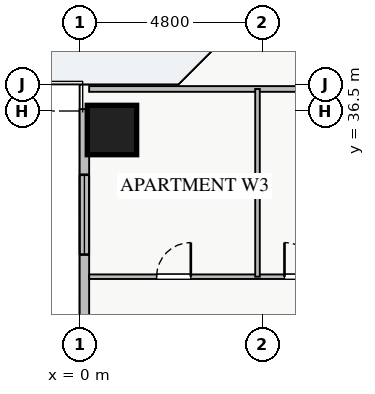
"""IFC4 building model, lengths in metres.
Left out: names, types, materials, properties, quantities, classifications, styles, units other than length and angle.
Written with IfcOpenShell. Run it as: python <this file> out.ifc"""

import sys

from ifc_helpers import new_model, si_unit, direction, frame, frame_2d, origin, origin_2d, place, context, subcontext, project, spatial, rectangle, extrude, source, transform, mapped, element, fill, save


model = new_model("IFC4")
c1 = context("Model", 3, precision=1e-05, world=origin(), true_north=direction((0.0, 1.0)))
c2 = subcontext(c1, "Body", "Model", "MODEL_VIEW")
j1 = project(units=[si_unit("LENGTHUNIT", "METRE"), si_unit("PLANEANGLEUNIT", "RADIAN")], contexts=[c1])
p1 = place(None, origin())
s1 = spatial("IfcSite", under=j1, at=p1, CompositionType="ELEMENT")
p2 = place(p1, origin())
s2 = spatial("IfcBuilding", under=s1, at=p2, CompositionType="ELEMENT")
p3 = place(p2, frame((0.0, 0.0, 42.5)))
s3 = spatial("IfcBuildingStorey", under=s2, at=p3, CompositionType="ELEMENT", Elevation=42.5)
m1 = source(origin(), c2, "Body", "SweptSolid", [
    extrude(rectangle(XDim=1.3, YDim=1.3, at=origin_2d()), origin(), (0.0, 0.0, 1.0), 3.25),
])
p4 = place(p3, frame((0.85, 36.0, 0.0), z_axis=(0.0, 0.0, 1.0), x_axis=(1.0, 0.0, 0.0)))
e1 = element("IfcColumn", 1, at=p4, inside=s3, PredefinedType="COLUMN", context=c2, shape_type="MappedRepresentation", body=[
    mapped(m1, transform((0.0, 0.0, 0.0), x_axis=(1.0, 0.0, 0.0), y_axis=(0.0, 1.0, 0.0), z_axis=(0.0, 0.0, 1.0), scale=1.0)),
])
p5 = place(p3, frame((0.125, 9.45, 0.0), z_axis=(0.0, 0.0, 1.0), x_axis=(0.0, 1.0, 0.0)))
e2 = element("IfcWall", 2, at=p5, inside=s3, PredefinedType="STANDARD", context=c2, shape_type="SweptSolid", body=[
    extrude(rectangle(XDim=27.1, YDim=0.25, at=frame_2d((13.55, 0.0))), origin(), (0.0, 0.0, 1.0), 2.57),
])
p6 = place(p5, frame((14.4, 0.0, 0.0)))
e3 = element("IfcOpeningElement", 3, at=p6, cuts=e2, PredefinedType="OPENING", context=c2, shape_type="SweptSolid", body=[
    extrude(rectangle(XDim=1.2, YDim=2.1, at=frame_2d((0.6, 1.05))), frame((0.0, 0.135, 0.0), z_axis=(0.0, -1.0, 0.0), x_axis=(1.0, 0.0, 0.0)), (0.0, 0.0, 1.0), 0.27),
])
p7 = place(p5, frame((2.188, 0.0, 0.9)))
e4 = element("IfcOpeningElement", 4, at=p7, cuts=e2, PredefinedType="OPENING", context=c2, shape_type="SweptSolid", body=[
    extrude(rectangle(XDim=2.4, YDim=1.48, at=frame_2d((1.2, 0.74))), frame((0.0, 0.135, 0.0), z_axis=(0.0, -1.0, 0.0), x_axis=(1.0, 0.0, 0.0)), (0.0, 0.0, 1.0), 0.27),
])
p8 = place(p5, frame((23.272, 0.0, 0.9)))
e5 = element("IfcOpeningElement", 5, at=p8, cuts=e2, PredefinedType="OPENING", context=c2, shape_type="SweptSolid", body=[
    extrude(rectangle(XDim=2.1, YDim=1.5, at=frame_2d((1.05, 0.75))), frame((0.0, 0.135, 0.0), z_axis=(0.0, -1.0, 0.0), x_axis=(1.0, 0.0, 0.0)), (0.0, 0.0, 1.0), 0.27),
])
p9 = place(p5, frame((13.05, 0.0, 0.9)))
e6 = element("IfcOpeningElement", 6, at=p9, cuts=e2, PredefinedType="OPENING", context=c2, shape_type="SweptSolid", body=[
    extrude(rectangle(XDim=0.9, YDim=1.2, at=frame_2d((0.45, 0.6))), frame((0.0, 0.135, 0.0), z_axis=(0.0, -1.0, 0.0), x_axis=(1.0, 0.0, 0.0)), (0.0, 0.0, 1.0), 0.27),
])
p10 = place(p5, frame((8.165, 0.0, 0.9)))
e7 = element("IfcOpeningElement", 7, at=p10, cuts=e2, PredefinedType="OPENING", context=c2, shape_type="SweptSolid", body=[
    extrude(rectangle(XDim=0.9, YDim=1.2, at=frame_2d((0.45, 0.6))), frame((0.0, 0.135, 0.0), z_axis=(0.0, -1.0, 0.0), x_axis=(1.0, 0.0, 0.0)), (0.0, 0.0, 1.0), 0.27),
])
p11 = place(p5, frame((18.365, 0.0, 0.9)))
e8 = element("IfcOpeningElement", 8, at=p11, cuts=e2, PredefinedType="OPENING", context=c2, shape_type="SweptSolid", body=[
    extrude(rectangle(XDim=0.9, YDim=1.2, at=frame_2d((0.45, 0.6))), frame((0.0, 0.135, 0.0), z_axis=(0.0, -1.0, 0.0), x_axis=(1.0, 0.0, 0.0)), (0.0, 0.0, 1.0), 0.27),
])
p12 = place(p3, frame((0.25, 37.08, 0.0), z_axis=(0.0, 0.0, 1.0), x_axis=(1.0, 0.0, 0.0)))
e9 = element("IfcWall", 9, at=p12, inside=s3, PredefinedType="PARTITIONING", context=c2, shape_type="SweptSolid", body=[
    extrude(rectangle(XDim=8.47, YDim=0.15, at=frame_2d((4.235, 0.0))), origin(), (0.0, 0.0, 1.0), 3.03),
])
p13 = place(p3, frame((0.25, 32.14, 0.0), z_axis=(0.0, 0.0, 1.0), x_axis=(1.0, 0.0, 0.0)))
e10 = element("IfcWall", 10, at=p13, inside=s3, PredefinedType="PLUMBINGWALL", context=c2, shape_type="SweptSolid", body=[
    extrude(rectangle(XDim=8.47, YDim=0.12, at=frame_2d((4.235, 0.0))), origin(), (0.0, 0.0, 1.0), 3.03),
])
p14 = place(p13, frame((1.775, 0.0, 0.0)))
e11 = element("IfcOpeningElement", 11, at=p14, cuts=e10, PredefinedType="OPENING", context=c2, shape_type="SweptSolid", body=[
    extrude(rectangle(XDim=0.9, YDim=2.05, at=frame_2d((0.45, 1.025))), frame((0.0, 0.07, 0.0), z_axis=(0.0, -1.0, 0.0), x_axis=(1.0, 0.0, 0.0)), (0.0, 0.0, 1.0), 0.14),
])
p15 = place(p13, frame((5.14, 0.0, 0.0)))
e12 = element("IfcOpeningElement", 12, at=p15, cuts=e10, PredefinedType="OPENING", context=c2, shape_type="SweptSolid", body=[
    extrude(rectangle(XDim=0.9, YDim=2.05, at=frame_2d((0.45, 1.025))), frame((0.0, 0.07, 0.0), z_axis=(0.0, -1.0, 0.0), x_axis=(1.0, 0.0, 0.0)), (0.0, 0.0, 1.0), 0.14),
])
p16 = place(p13, frame((7.175, 0.0, 0.0)))
e13 = element("IfcOpeningElement", 13, at=p16, cuts=e10, PredefinedType="OPENING", context=c2, shape_type="SweptSolid", body=[
    extrude(rectangle(XDim=0.85, YDim=2.05, at=frame_2d((0.425, 1.025))), frame((0.0, 0.07, 0.0), z_axis=(0.0, -1.0, 0.0), x_axis=(1.0, 0.0, 0.0)), (0.0, 0.0, 1.0), 0.14),
])
p17 = place(p3, frame((4.68, 32.14, 0.0), z_axis=(0.0, 0.0, 1.0), x_axis=(0.0, 1.0, 0.0)))
e14 = element("IfcWall", 14, at=p17, inside=s3, PredefinedType="PLUMBINGWALL", context=c2, shape_type="SweptSolid", body=[
    extrude(rectangle(XDim=4.94, YDim=0.12, at=frame_2d((2.47, 0.0))), origin(), (0.0, 0.0, 1.0), 3.03),
])
m2 = source(origin(), c2, "Body", "SweptSolid", [
    extrude(rectangle(XDim=2.1, YDim=1.5, at=frame_2d((1.05, 0.75))), frame((0.0, 0.03, 0.0), z_axis=(0.0, -1.0, 0.0), x_axis=(1.0, 0.0, 0.0)), (0.0, 0.0, 1.0), 0.06),
])
p18 = place(p8, origin())
e15 = element("IfcWindow", 15, at=p18, inside=s3, PartitioningType="TRIPLE_PANEL_VERTICAL", PredefinedType="WINDOW", context=c2, shape_type="MappedRepresentation", body=[
    mapped(m2, transform((0.0, 0.0, 0.0), x_axis=(1.0, 0.0, 0.0), y_axis=(0.0, 1.0, 0.0), z_axis=(0.0, 0.0, 1.0), scale=1.0)),
])
fill(e5, e15)
m3 = source(origin(), c2, "Body", "SweptSolid", [
    extrude(rectangle(XDim=0.9, YDim=2.05, at=frame_2d((0.45, 1.025))), frame((0.0, 0.025, 0.0), z_axis=(0.0, -1.0, 0.0), x_axis=(1.0, 0.0, 0.0)), (0.0, 0.0, 1.0), 0.05),
])
p19 = place(p14, origin())
e16 = element("IfcDoor", 16, at=p19, inside=s3, OperationType="SINGLE_SWING_RIGHT", PredefinedType="DOOR", context=c2, shape_type="MappedRepresentation", body=[
    mapped(m3, transform((0.0, 0.0, 0.0), x_axis=(1.0, 0.0, 0.0), y_axis=(0.0, 1.0, 0.0), z_axis=(0.0, 0.0, 1.0), scale=1.0)),
])
fill(e11, e16)
p20 = place(p15, origin())
e17 = element("IfcDoor", 17, at=p20, inside=s3, OperationType="SINGLE_SWING_LEFT", PredefinedType="DOOR", context=c2, shape_type="MappedRepresentation", body=[
    mapped(m3, transform((0.0, 0.0, 0.0), x_axis=(1.0, 0.0, 0.0), y_axis=(0.0, 1.0, 0.0), z_axis=(0.0, 0.0, 1.0), scale=1.0)),
])
fill(e12, e17)
save(model, sys.argv[1])
